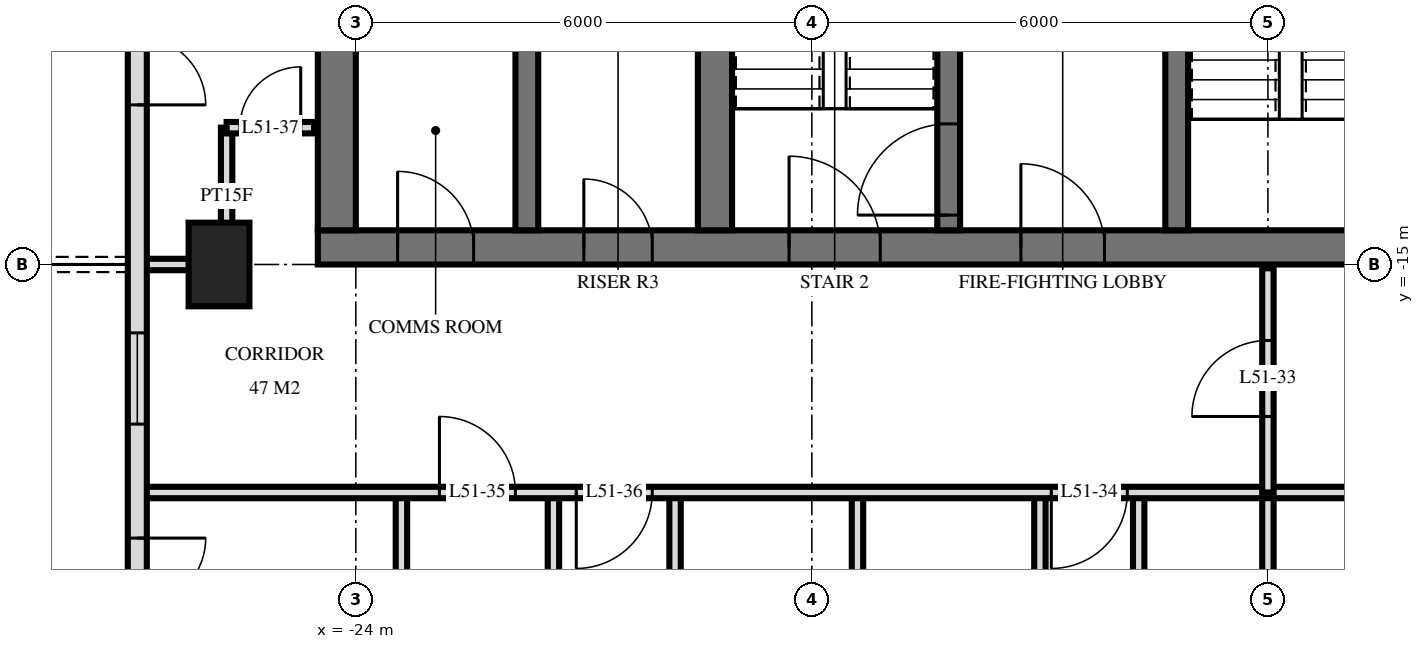
"""IFC4 building model, lengths in metres.
Left out: names, types, materials, properties, quantities, classifications, styles, units other than length and angle.
Written with IfcOpenShell. Run it as: python <this file> out.ifc"""

import sys

from ifc_helpers import new_model, si_unit, direction, frame, frame_2d, origin, origin_2d, place, context, subcontext, project, spatial, rectangle, extrude, element, fill, save


model = new_model("IFC4")
c1 = context("Model", 3, precision=1e-05, world=origin(), true_north=direction((0.0, 1.0)))
c2 = subcontext(c1, "Body", "Model", "MODEL_VIEW")
j1 = project(units=[si_unit("LENGTHUNIT", "METRE"), si_unit("PLANEANGLEUNIT", "RADIAN")], contexts=[c1])
p1 = place(None, origin())
s1 = spatial("IfcSite", under=j1, at=p1, CompositionType="ELEMENT")
p2 = place(p1, origin())
s2 = spatial("IfcBuilding", under=s1, at=p2, CompositionType="ELEMENT")
p3 = place(p2, frame((0.0, 0.0, 197.6)))
s3 = spatial("IfcBuildingStorey", under=s2, at=p3, CompositionType="ELEMENT", Elevation=197.6)
p4 = place(p3, frame((-25.8, -15.0, 0.0), z_axis=(0.0, 0.0, 1.0), x_axis=(0.0, 1.0, 0.0)))
e1 = element("IfcColumn", 1, at=p4, inside=s3, PredefinedType="COLUMN", context=c2, shape_type="SweptSolid", body=[
    extrude(rectangle(XDim=1.1, YDim=0.8, at=origin_2d()), origin(), (0.0, 0.0, 1.0), 3.5),
])
p5 = place(p3, frame((-24.5, -14.775, 0.0), z_axis=(0.0, 0.0, 1.0), x_axis=(1.0, 0.0, 0.0)))
e2 = element("IfcWall", 2, at=p5, inside=s3, PredefinedType="SHEAR", context=c2, shape_type="SweptSolid", body=[
    extrude(rectangle(XDim=14.5, YDim=0.45, at=frame_2d((7.25, 0.0))), origin(), (0.0, 0.0, 1.0), 3.5),
])
p6 = place(p5, frame((6.2, 0.0, 0.0)))
e3 = element("IfcOpeningElement", 3, at=p6, cuts=e2, PredefinedType="OPENING", context=c2, shape_type="SweptSolid", body=[
    extrude(rectangle(XDim=1.2, YDim=2.1, at=frame_2d((0.6, 1.05))), frame((0.0, 0.235, 0.0), z_axis=(0.0, -1.0, 0.0), x_axis=(1.0, 0.0, 0.0)), (0.0, 0.0, 1.0), 0.47),
])
p7 = place(p5, frame((9.25, 0.0, 0.0)))
e4 = element("IfcOpeningElement", 4, at=p7, cuts=e2, PredefinedType="OPENING", context=c2, shape_type="SweptSolid", body=[
    extrude(rectangle(XDim=1.1, YDim=2.1, at=frame_2d((0.55, 1.05))), frame((0.0, 0.235, 0.0), z_axis=(0.0, -1.0, 0.0), x_axis=(1.0, 0.0, 0.0)), (0.0, 0.0, 1.0), 0.47),
])
p8 = place(p5, frame((3.5, 0.0, 0.0)))
e5 = element("IfcOpeningElement", 5, at=p8, cuts=e2, PredefinedType="OPENING", context=c2, shape_type="SweptSolid", body=[
    extrude(rectangle(XDim=0.9, YDim=2.1, at=frame_2d((0.45, 1.05))), frame((0.0, 0.235, 0.0), z_axis=(0.0, -1.0, 0.0), x_axis=(1.0, 0.0, 0.0)), (0.0, 0.0, 1.0), 0.47),
])
p9 = place(p5, frame((1.05, 0.0, 0.0)))
e6 = element("IfcOpeningElement", 6, at=p9, cuts=e2, PredefinedType="OPENING", context=c2, shape_type="SweptSolid", body=[
    extrude(rectangle(XDim=1.0, YDim=2.1, at=frame_2d((0.5, 1.05))), frame((0.0, 0.235, 0.0), z_axis=(0.0, -1.0, 0.0), x_axis=(1.0, 0.0, 0.0)), (0.0, 0.0, 1.0), 0.47),
])
p10 = place(p3, frame((-24.25, -14.55, 0.0), z_axis=(0.0, 0.0, 1.0), x_axis=(0.0, 1.0, 0.0)))
e7 = element("IfcWall", 7, at=p10, inside=s3, PredefinedType="SHEAR", context=c2, shape_type="SweptSolid", body=[
    extrude(rectangle(XDim=14.1, YDim=0.5, at=frame_2d((7.05, 0.0))), origin(), (0.0, 0.0, 1.0), 3.5),
])
p11 = place(p3, frame((-13.2, -14.55, 0.0), z_axis=(0.0, 0.0, 1.0), x_axis=(0.0, 1.0, 0.0)))
e8 = element("IfcWall", 8, at=p11, inside=s3, PredefinedType="SHEAR", context=c2, shape_type="SweptSolid", body=[
    extrude(rectangle(XDim=5.4, YDim=0.3, at=frame_2d((2.7, 0.0))), origin(), (0.0, 0.0, 1.0), 3.5),
])
p12 = place(p11, frame((4.0, 0.0, 0.0)))
e9 = element("IfcOpeningElement", 9, at=p12, cuts=e8, PredefinedType="OPENING", context=c2, shape_type="SweptSolid", body=[
    extrude(rectangle(XDim=1.2, YDim=2.1, at=frame_2d((0.6, 1.05))), frame((0.0, 0.16, 0.0), z_axis=(0.0, -1.0, 0.0), x_axis=(1.0, 0.0, 0.0)), (0.0, 0.0, 1.0), 0.32),
])
p13 = place(p3, frame((-16.2, -14.55, 0.0), z_axis=(0.0, 0.0, 1.0), x_axis=(0.0, 1.0, 0.0)))
e10 = element("IfcWall", 10, at=p13, inside=s3, PredefinedType="SHEAR", context=c2, shape_type="SweptSolid", body=[
    extrude(rectangle(XDim=5.4, YDim=0.3, at=frame_2d((2.7, 0.0))), origin(), (0.0, 0.0, 1.0), 3.5),
])
p14 = place(p13, frame((0.2, 0.0, 0.0)))
e11 = element("IfcOpeningElement", 11, at=p14, cuts=e10, PredefinedType="OPENING", context=c2, shape_type="SweptSolid", body=[
    extrude(rectangle(XDim=1.2, YDim=2.1, at=frame_2d((0.6, 1.05))), frame((0.0, 0.16, 0.0), z_axis=(0.0, -1.0, 0.0), x_axis=(1.0, 0.0, 0.0)), (0.0, 0.0, 1.0), 0.32),
])
p15 = place(p3, frame((-19.275, -14.55, 0.0), z_axis=(0.0, 0.0, 1.0), x_axis=(0.0, 1.0, 0.0)))
e12 = element("IfcWall", 12, at=p15, inside=s3, PredefinedType="SHEAR", context=c2, shape_type="SweptSolid", body=[
    extrude(rectangle(XDim=5.4, YDim=0.45, at=frame_2d((2.7, 0.0))), origin(), (0.0, 0.0, 1.0), 3.5),
])
p16 = place(p3, frame((-21.75, -14.55, 0.0), z_axis=(0.0, 0.0, 1.0), x_axis=(0.0, 1.0, 0.0)))
e13 = element("IfcWall", 13, at=p16, inside=s3, PredefinedType="SHEAR", context=c2, shape_type="SweptSolid", body=[
    extrude(rectangle(XDim=5.4, YDim=0.3, at=frame_2d((2.7, 0.0))), origin(), (0.0, 0.0, 1.0), 3.5),
])
p17 = place(p3, frame((-26.875, -3.325, 0.0), z_axis=(0.0, 0.0, 1.0), x_axis=(0.0, -1.0, 0.0)))
e14 = element("IfcWall", 14, at=p17, inside=s3, PredefinedType="SOLIDWALL", context=c2, shape_type="SweptSolid", body=[
    extrude(rectangle(XDim=21.551, YDim=0.25, at=frame_2d((10.775, 0.0))), origin(), (0.0, 0.0, 1.0), 3.22),
])
p18 = place(p17, frame((7.775, 0.0, 0.0)))
e15 = element("IfcOpeningElement", 15, at=p18, cuts=e14, PredefinedType="OPENING", context=c2, shape_type="SweptSolid", body=[
    extrude(rectangle(XDim=1.8, YDim=2.4, at=frame_2d((0.9, 1.2))), frame((0.0, 0.135, 0.0), z_axis=(0.0, -1.0, 0.0), x_axis=(1.0, 0.0, 0.0)), (0.0, 0.0, 1.0), 0.27),
])
p19 = place(p17, frame((12.575, 0.0, 0.9)))
e16 = element("IfcOpeningElement", 16, at=p19, cuts=e14, PredefinedType="OPENING", context=c2, shape_type="SweptSolid", body=[
    extrude(rectangle(XDim=1.2, YDim=1.5, at=frame_2d((0.6, 0.75))), frame((0.0, 0.135, 0.0), z_axis=(0.0, -1.0, 0.0), x_axis=(1.0, 0.0, 0.0)), (0.0, 0.0, 1.0), 0.27),
])
p20 = place(p17, frame((15.275, 0.0, 0.0)))
e17 = element("IfcOpeningElement", 17, at=p20, cuts=e14, PredefinedType="OPENING", context=c2, shape_type="SweptSolid", body=[
    extrude(rectangle(XDim=1.8, YDim=2.4, at=frame_2d((0.9, 1.2))), frame((0.0, 0.135, 0.0), z_axis=(0.0, -1.0, 0.0), x_axis=(1.0, 0.0, 0.0)), (0.0, 0.0, 1.0), 0.27),
])
p21 = place(p17, frame((19.325, 0.0, 0.0)))
e18 = element("IfcOpeningElement", 18, at=p21, cuts=e14, PredefinedType="OPENING", context=c2, shape_type="SweptSolid", body=[
    extrude(rectangle(XDim=1.8, YDim=2.4, at=frame_2d((0.9, 1.2))), frame((0.0, 0.135, 0.0), z_axis=(0.0, -1.0, 0.0), x_axis=(1.0, 0.0, 0.0)), (0.0, 0.0, 1.0), 0.27),
])
p22 = place(p3, frame((-12.0, -18.0, 0.0), z_axis=(0.0, 0.0, 1.0), x_axis=(0.0, 1.0, 0.0)))
e19 = element("IfcWall", 19, at=p22, inside=s3, PredefinedType="PARTITIONING", context=c2, shape_type="SweptSolid", body=[
    extrude(rectangle(XDim=2.95, YDim=0.15, at=frame_2d((1.475, 0.0))), origin(), (0.0, 0.0, 1.0), 3.22),
])
p23 = place(p22, frame((1.0, 0.0, 0.0)))
e20 = element("IfcOpeningElement", 20, at=p23, cuts=e19, PredefinedType="OPENING", context=c2, shape_type="SweptSolid", body=[
    extrude(rectangle(XDim=1.0, YDim=2.1, at=frame_2d((0.5, 1.05))), frame((0.0, 0.085, 0.0), z_axis=(0.0, -1.0, 0.0), x_axis=(1.0, 0.0, 0.0)), (0.0, 0.0, 1.0), 0.17),
])
p24 = place(p3, frame((-12.0, -29.22, 0.0), z_axis=(0.0, 0.0, 1.0), x_axis=(0.0, 1.0, 0.0)))
e21 = element("IfcWall", 21, at=p24, inside=s3, PredefinedType="PARTITIONING", context=c2, shape_type="SweptSolid", body=[
    extrude(rectangle(XDim=11.22, YDim=0.15, at=frame_2d((5.61, 0.0))), origin(), (0.0, 0.0, 1.0), 3.22),
])
p25 = place(p3, frame((-13.7, -22.2, 0.0), z_axis=(0.0, 0.0, 1.0), x_axis=(0.0, 1.0, 0.0)))
e22 = element("IfcWall", 22, at=p25, inside=s3, PredefinedType="PARTITIONING", context=c2, shape_type="SweptSolid", body=[
    extrude(rectangle(XDim=4.2, YDim=0.15, at=frame_2d((2.1, 0.0))), origin(), (0.0, 0.0, 1.0), 3.22),
])
p26 = place(p25, frame((1.72, 0.0, 0.0)))
e23 = element("IfcOpeningElement", 23, at=p26, cuts=e22, PredefinedType="OPENING", context=c2, shape_type="SweptSolid", body=[
    extrude(rectangle(XDim=0.8, YDim=2.1, at=frame_2d((0.4, 1.05))), frame((0.0, 0.085, 0.0), z_axis=(0.0, -1.0, 0.0), x_axis=(1.0, 0.0, 0.0)), (0.0, 0.0, 1.0), 0.17),
])
p27 = place(p3, frame((-15.0, -29.22, 0.0), z_axis=(0.0, 0.0, 1.0), x_axis=(0.0, 1.0, 0.0)))
e24 = element("IfcWall", 24, at=p27, inside=s3, PredefinedType="PARTITIONING", context=c2, shape_type="SweptSolid", body=[
    extrude(rectangle(XDim=11.22, YDim=0.15, at=frame_2d((5.61, 0.0))), origin(), (0.0, 0.0, 1.0), 3.22),
])
for number, where, z_axis, x_axis in (
    (25, (-17.4, -22.2, 0.0), (0.0, 0.0, 1.0), (0.0, 1.0, 0.0)),
    (26, (-19.8, -22.2, 0.0), (0.0, 0.0, 1.0), (0.0, 1.0, 0.0)),
    (27, (-21.4, -22.2, 0.0), (0.0, 0.0, 1.0), (0.0, 1.0, 0.0)),
):
    element("IfcWall", number, at=place(p3, frame(where, z_axis=z_axis, x_axis=x_axis)), inside=s3, PredefinedType="PARTITIONING", context=c2, shape_type="SweptSolid", body=[
        extrude(rectangle(XDim=4.2, YDim=0.15, at=frame_2d((2.1, 0.0))), origin(), (0.0, 0.0, 1.0), 3.22),
    ])
p28 = place(p3, frame((-23.4, -22.2, 0.0), z_axis=(0.0, 0.0, 1.0), x_axis=(0.0, 1.0, 0.0)))
e28 = element("IfcWall", 28, at=p28, inside=s3, PredefinedType="PARTITIONING", context=c2, shape_type="SweptSolid", body=[
    extrude(rectangle(XDim=4.2, YDim=0.15, at=frame_2d((2.1, 0.0))), origin(), (0.0, 0.0, 1.0), 3.22),
])
p29 = place(p28, frame((1.58, 0.0, 0.0)))
e29 = element("IfcOpeningElement", 29, at=p29, cuts=e28, PredefinedType="OPENING", context=c2, shape_type="SweptSolid", body=[
    extrude(rectangle(XDim=1.0, YDim=2.1, at=frame_2d((0.5, 1.05))), frame((0.0, 0.085, 0.0), z_axis=(0.0, -1.0, 0.0), x_axis=(1.0, 0.0, 0.0)), (0.0, 0.0, 1.0), 0.17),
])
p30 = place(p3, frame((-25.7, -15.0, 0.0), z_axis=(0.0, 0.0, 1.0), x_axis=(0.0, 1.0, 0.0)))
e30 = element("IfcWall", 30, at=p30, inside=s3, PredefinedType="PARTITIONING", context=c2, shape_type="SweptSolid", body=[
    extrude(rectangle(XDim=1.8, YDim=0.15, at=frame_2d((0.9, 0.0))), origin(), (0.0, 0.0, 1.0), 3.22),
])
p31 = place(p3, frame((-26.82, -18.0, 0.0), z_axis=(0.0, 0.0, 1.0), x_axis=(1.0, 0.0, 0.0)))
e31 = element("IfcWall", 31, at=p31, inside=s3, PredefinedType="PARTITIONING", context=c2, shape_type="SweptSolid", body=[
    extrude(rectangle(XDim=53.64, YDim=0.15, at=frame_2d((26.82, 0.0))), origin(), (0.0, 0.0, 1.0), 3.22),
])
p32 = place(p31, frame((11.97, 0.0, 0.0)))
e32 = element("IfcOpeningElement", 32, at=p32, cuts=e31, PredefinedType="OPENING", context=c2, shape_type="SweptSolid", body=[
    extrude(rectangle(XDim=1.0, YDim=2.1, at=frame_2d((0.5, 1.05))), frame((0.0, 0.085, 0.0), z_axis=(0.0, -1.0, 0.0), x_axis=(1.0, 0.0, 0.0)), (0.0, 0.0, 1.0), 0.17),
])
p33 = place(p31, frame((3.92, 0.0, 0.0)))
e33 = element("IfcOpeningElement", 33, at=p33, cuts=e31, PredefinedType="OPENING", context=c2, shape_type="SweptSolid", body=[
    extrude(rectangle(XDim=1.0, YDim=2.1, at=frame_2d((0.5, 1.05))), frame((0.0, 0.085, 0.0), z_axis=(0.0, -1.0, 0.0), x_axis=(1.0, 0.0, 0.0)), (0.0, 0.0, 1.0), 0.17),
])
p34 = place(p31, frame((5.72, 0.0, 0.0)))
e34 = element("IfcOpeningElement", 34, at=p34, cuts=e31, PredefinedType="OPENING", context=c2, shape_type="SweptSolid", body=[
    extrude(rectangle(XDim=1.0, YDim=2.1, at=frame_2d((0.5, 1.05))), frame((0.0, 0.085, 0.0), z_axis=(0.0, -1.0, 0.0), x_axis=(1.0, 0.0, 0.0)), (0.0, 0.0, 1.0), 0.17),
])
p35 = place(p31, frame((40.67, 0.0, 0.0)))
e35 = element("IfcOpeningElement", 35, at=p35, cuts=e31, PredefinedType="OPENING", context=c2, shape_type="SweptSolid", body=[
    extrude(rectangle(XDim=1.0, YDim=2.1, at=frame_2d((0.5, 1.05))), frame((0.0, 0.085, 0.0), z_axis=(0.0, -1.0, 0.0), x_axis=(1.0, 0.0, 0.0)), (0.0, 0.0, 1.0), 0.17),
])
p36 = place(p31, frame((48.72, 0.0, 0.0)))
e36 = element("IfcOpeningElement", 36, at=p36, cuts=e31, PredefinedType="OPENING", context=c2, shape_type="SweptSolid", body=[
    extrude(rectangle(XDim=1.0, YDim=2.1, at=frame_2d((0.5, 1.05))), frame((0.0, 0.085, 0.0), z_axis=(0.0, -1.0, 0.0), x_axis=(1.0, 0.0, 0.0)), (0.0, 0.0, 1.0), 0.17),
])
p37 = place(p31, frame((46.92, 0.0, 0.0)))
e37 = element("IfcOpeningElement", 37, at=p37, cuts=e31, PredefinedType="OPENING", context=c2, shape_type="SweptSolid", body=[
    extrude(rectangle(XDim=1.0, YDim=2.1, at=frame_2d((0.5, 1.05))), frame((0.0, 0.085, 0.0), z_axis=(0.0, -1.0, 0.0), x_axis=(1.0, 0.0, 0.0)), (0.0, 0.0, 1.0), 0.17),
])
p38 = place(p31, frame((17.32, 0.0, 0.0)))
e38 = element("IfcOpeningElement", 38, at=p38, cuts=e31, PredefinedType="OPENING", context=c2, shape_type="SweptSolid", body=[
    extrude(rectangle(XDim=1.0, YDim=2.1, at=frame_2d((0.5, 1.05))), frame((0.0, 0.085, 0.0), z_axis=(0.0, -1.0, 0.0), x_axis=(1.0, 0.0, 0.0)), (0.0, 0.0, 1.0), 0.17),
])
p39 = place(p31, frame((23.32, 0.0, 0.0)))
e39 = element("IfcOpeningElement", 39, at=p39, cuts=e31, PredefinedType="OPENING", context=c2, shape_type="SweptSolid", body=[
    extrude(rectangle(XDim=1.0, YDim=2.1, at=frame_2d((0.5, 1.05))), frame((0.0, 0.085, 0.0), z_axis=(0.0, -1.0, 0.0), x_axis=(1.0, 0.0, 0.0)), (0.0, 0.0, 1.0), 0.17),
])
p40 = place(p31, frame((29.32, 0.0, 0.0)))
e40 = element("IfcOpeningElement", 40, at=p40, cuts=e31, PredefinedType="OPENING", context=c2, shape_type="SweptSolid", body=[
    extrude(rectangle(XDim=1.0, YDim=2.1, at=frame_2d((0.5, 1.05))), frame((0.0, 0.085, 0.0), z_axis=(0.0, -1.0, 0.0), x_axis=(1.0, 0.0, 0.0)), (0.0, 0.0, 1.0), 0.17),
])
p41 = place(p31, frame((35.32, 0.0, 0.0)))
e41 = element("IfcOpeningElement", 41, at=p41, cuts=e31, PredefinedType="OPENING", context=c2, shape_type="SweptSolid", body=[
    extrude(rectangle(XDim=1.0, YDim=2.1, at=frame_2d((0.5, 1.05))), frame((0.0, 0.085, 0.0), z_axis=(0.0, -1.0, 0.0), x_axis=(1.0, 0.0, 0.0)), (0.0, 0.0, 1.0), 0.17),
])
p42 = place(p3, frame((-26.82, -15.0, 0.0), z_axis=(0.0, 0.0, 1.0), x_axis=(1.0, 0.0, 0.0)))
e42 = element("IfcWall", 42, at=p42, inside=s3, PredefinedType="PARTITIONING", context=c2, shape_type="SweptSolid", body=[
    extrude(rectangle(XDim=1.12, YDim=0.15, at=frame_2d((0.56, 0.0))), origin(), (0.0, 0.0, 1.0), 3.22),
])
p43 = place(p3, frame((-25.7, -13.2, 0.0), z_axis=(0.0, 0.0, 1.0), x_axis=(1.0, 0.0, 0.0)))
e43 = element("IfcWall", 43, at=p43, inside=s3, PredefinedType="PARTITIONING", context=c2, shape_type="SweptSolid", body=[
    extrude(rectangle(XDim=1.15, YDim=0.15, at=frame_2d((0.575, 0.0))), origin(), (0.0, 0.0, 1.0), 3.22),
])
p44 = place(p43, frame((0.175, 0.0, 0.0)))
e44 = element("IfcOpeningElement", 44, at=p44, cuts=e43, PredefinedType="OPENING", context=c2, shape_type="SweptSolid", body=[
    extrude(rectangle(XDim=0.8, YDim=2.1, at=frame_2d((0.4, 1.05))), frame((0.0, 0.085, 0.0), z_axis=(0.0, -1.0, 0.0), x_axis=(1.0, 0.0, 0.0)), (0.0, 0.0, 1.0), 0.17),
])
p45 = place(p18, origin())
e45 = element("IfcDoor", 45, at=p45, inside=s3, OperationType="DOUBLE_DOOR_SINGLE_SWING", PredefinedType="DOOR", context=c2, shape_type="SweptSolid", body=[
    extrude(rectangle(XDim=1.8, YDim=2.4, at=frame_2d((0.9, 1.2))), frame((0.0, 0.025, 0.0), z_axis=(0.0, -1.0, 0.0), x_axis=(1.0, 0.0, 0.0)), (0.0, 0.0, 1.0), 0.05),
])
fill(e15, e45)
p46 = place(p19, origin())
e46 = element("IfcWindow", 46, at=p46, inside=s3, PartitioningType="SINGLE_PANEL", PredefinedType="WINDOW", context=c2, shape_type="SweptSolid", body=[
    extrude(rectangle(XDim=1.2, YDim=1.5, at=frame_2d((0.6, 0.75))), frame((0.0, 0.03, 0.0), z_axis=(0.0, -1.0, 0.0), x_axis=(1.0, 0.0, 0.0)), (0.0, 0.0, 1.0), 0.06),
])
fill(e16, e46)
p47 = place(p20, origin())
e47 = element("IfcDoor", 47, at=p47, inside=s3, OperationType="DOUBLE_DOOR_SINGLE_SWING", PredefinedType="DOOR", context=c2, shape_type="SweptSolid", body=[
    extrude(rectangle(XDim=1.8, YDim=2.4, at=frame_2d((0.9, 1.2))), frame((0.0, 0.025, 0.0), z_axis=(0.0, -1.0, 0.0), x_axis=(1.0, 0.0, 0.0)), (0.0, 0.0, 1.0), 0.05),
])
fill(e17, e47)
p48 = place(p6, origin())
e48 = element("IfcDoor", 48, at=p48, inside=s3, OperationType="SINGLE_SWING_RIGHT", PredefinedType="DOOR", context=c2, shape_type="SweptSolid", body=[
    extrude(rectangle(XDim=1.2, YDim=2.1, at=frame_2d((0.6, 1.05))), frame((0.0, 0.025, 0.0), z_axis=(0.0, -1.0, 0.0), x_axis=(1.0, 0.0, 0.0)), (0.0, 0.0, 1.0), 0.05),
])
fill(e3, e48)
p49 = place(p7, origin())
e49 = element("IfcDoor", 49, at=p49, inside=s3, OperationType="SINGLE_SWING_RIGHT", PredefinedType="DOOR", context=c2, shape_type="SweptSolid", body=[
    extrude(rectangle(XDim=1.1, YDim=2.1, at=frame_2d((0.55, 1.05))), frame((0.0, 0.025, 0.0), z_axis=(0.0, -1.0, 0.0), x_axis=(1.0, 0.0, 0.0)), (0.0, 0.0, 1.0), 0.05),
])
fill(e4, e49)
p50 = place(p8, origin())
e50 = element("IfcDoor", 50, at=p50, inside=s3, OperationType="SINGLE_SWING_RIGHT", PredefinedType="DOOR", context=c2, shape_type="SweptSolid", body=[
    extrude(rectangle(XDim=0.9, YDim=2.1, at=frame_2d((0.45, 1.05))), frame((0.0, 0.025, 0.0), z_axis=(0.0, -1.0, 0.0), x_axis=(1.0, 0.0, 0.0)), (0.0, 0.0, 1.0), 0.05),
])
fill(e5, e50)
p51 = place(p9, origin())
e51 = element("IfcDoor", 51, at=p51, inside=s3, OperationType="SINGLE_SWING_RIGHT", PredefinedType="DOOR", context=c2, shape_type="SweptSolid", body=[
    extrude(rectangle(XDim=1.0, YDim=2.1, at=frame_2d((0.5, 1.05))), frame((0.0, 0.025, 0.0), z_axis=(0.0, -1.0, 0.0), x_axis=(1.0, 0.0, 0.0)), (0.0, 0.0, 1.0), 0.05),
])
fill(e6, e51)
p52 = place(p14, origin())
e52 = element("IfcDoor", 52, at=p52, inside=s3, OperationType="SINGLE_SWING_RIGHT", PredefinedType="DOOR", context=c2, shape_type="SweptSolid", body=[
    extrude(rectangle(XDim=1.2, YDim=2.1, at=frame_2d((0.6, 1.05))), frame((0.0, 0.025, 0.0), z_axis=(0.0, -1.0, 0.0), x_axis=(1.0, 0.0, 0.0)), (0.0, 0.0, 1.0), 0.05),
])
fill(e11, e52)
p53 = place(p23, origin())
e53 = element("IfcDoor", 53, at=p53, inside=s3, OperationType="SINGLE_SWING_RIGHT", PredefinedType="DOOR", context=c2, shape_type="SweptSolid", body=[
    extrude(rectangle(XDim=1.0, YDim=2.1, at=frame_2d((0.5, 1.05))), frame((0.0, 0.025, 0.0), z_axis=(0.0, -1.0, 0.0), x_axis=(1.0, 0.0, 0.0)), (0.0, 0.0, 1.0), 0.05),
])
fill(e20, e53)
p54 = place(p32, frame((0.5, 0.0, 0.0), z_axis=(0.0, 0.0, 1.0), x_axis=(-1.0, 0.0, 0.0)))
e54 = element("IfcDoor", 54, at=p54, inside=s3, OperationType="SINGLE_SWING_LEFT", PredefinedType="DOOR", context=c2, shape_type="SweptSolid", body=[
    extrude(rectangle(XDim=1.0, YDim=2.1, at=frame_2d((0.0, 1.05))), frame((0.0, -0.025, 0.0), z_axis=(0.0, 1.0, 0.0), x_axis=(-1.0, 0.0, 0.0)), (0.0, 0.0, 1.0), 0.05),
])
fill(e32, e54)
p55 = place(p33, origin())
e55 = element("IfcDoor", 55, at=p55, inside=s3, OperationType="SINGLE_SWING_RIGHT", PredefinedType="DOOR", context=c2, shape_type="SweptSolid", body=[
    extrude(rectangle(XDim=1.0, YDim=2.1, at=frame_2d((0.5, 1.05))), frame((0.0, 0.025, 0.0), z_axis=(0.0, -1.0, 0.0), x_axis=(1.0, 0.0, 0.0)), (0.0, 0.0, 1.0), 0.05),
])
fill(e33, e55)
p56 = place(p34, frame((0.5, 0.0, 0.0), z_axis=(0.0, 0.0, 1.0), x_axis=(-1.0, 0.0, 0.0)))
e56 = element("IfcDoor", 56, at=p56, inside=s3, OperationType="SINGLE_SWING_LEFT", PredefinedType="DOOR", context=c2, shape_type="SweptSolid", body=[
    extrude(rectangle(XDim=1.0, YDim=2.1, at=frame_2d((0.0, 1.05))), frame((0.0, -0.025, 0.0), z_axis=(0.0, 1.0, 0.0), x_axis=(-1.0, 0.0, 0.0)), (0.0, 0.0, 1.0), 0.05),
])
fill(e34, e56)
p57 = place(p44, origin())
e57 = element("IfcDoor", 57, at=p57, inside=s3, OperationType="SINGLE_SWING_LEFT", PredefinedType="DOOR", context=c2, shape_type="SweptSolid", body=[
    extrude(rectangle(XDim=0.8, YDim=2.1, at=frame_2d((0.4, 1.05))), frame((0.0, 0.025, 0.0), z_axis=(0.0, -1.0, 0.0), x_axis=(1.0, 0.0, 0.0)), (0.0, 0.0, 1.0), 0.05),
])
fill(e44, e57)
save(model, sys.argv[1])
